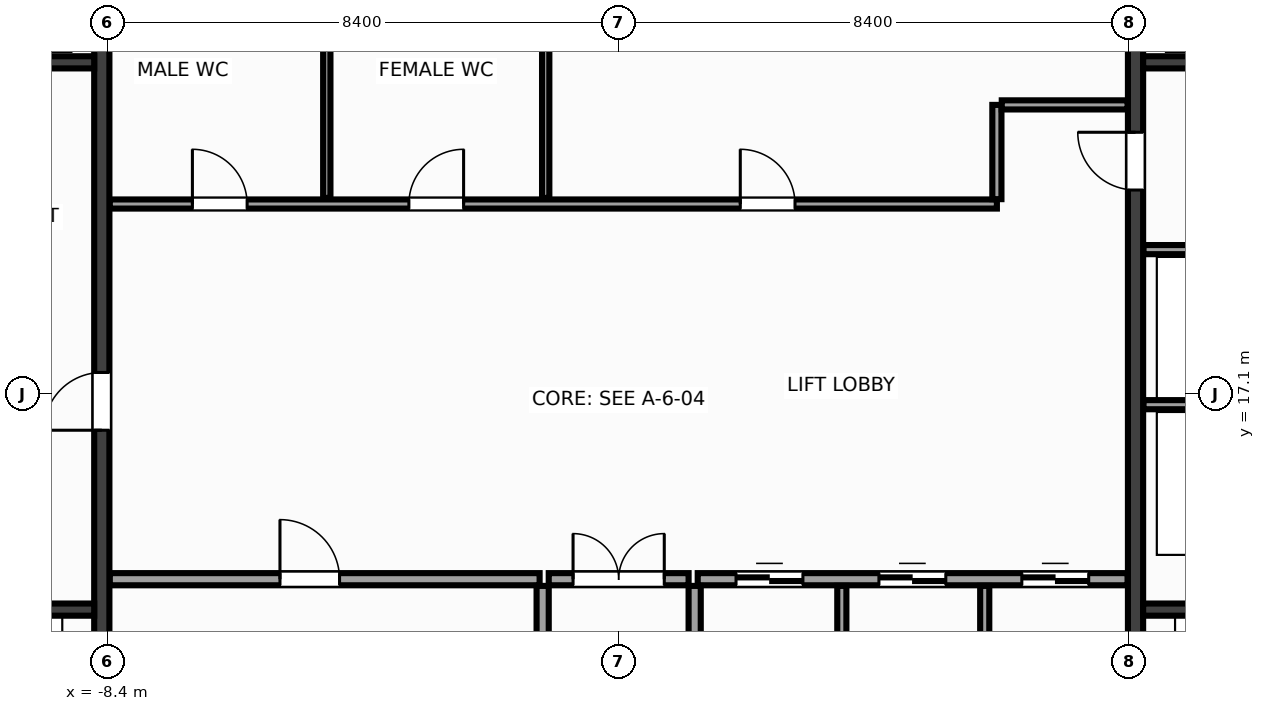
"""IFC4 building model, lengths in metres.
Left out: names, types, materials, properties, quantities, classifications, styles, units other than length and angle.
Written with IfcOpenShell. Run it as: python <this file> out.ifc"""

import sys

from ifc_helpers import new_model, si_unit, direction, frame, frame_2d, origin, place, context, subcontext, project, spatial, rectangle, extrude, source, transform, mapped, element, fill, save


model = new_model("IFC4")
c1 = context("Model", 3, precision=1e-05, world=origin(), true_north=direction((0.0, 1.0)))
c2 = subcontext(c1, "Body", "Model", "MODEL_VIEW")
j1 = project(units=[si_unit("LENGTHUNIT", "METRE"), si_unit("PLANEANGLEUNIT", "RADIAN")], contexts=[c1])
p1 = place(None, origin())
s1 = spatial("IfcSite", under=j1, at=p1, CompositionType="ELEMENT")
p2 = place(p1, origin())
s2 = spatial("IfcBuilding", under=s1, at=p2, CompositionType="ELEMENT")
p3 = place(p2, frame((0.0, 0.0, 106.4)))
s3 = spatial("IfcBuildingStorey", under=s2, at=p3, CompositionType="ELEMENT", Elevation=106.4)
m1 = source(origin(), c2, "Body", "SweptSolid", [
    extrude(rectangle(XDim=12.95, YDim=0.25, at=frame_2d((6.475, 0.0))), origin(), (0.0, 0.0, 1.0), 3.6),
])
p4 = place(p3, frame((-8.5, 10.525, 0.0), z_axis=(0.0, 0.0, 1.0), x_axis=(0.0, 1.0, 0.0)))
e1 = element("IfcWall", 1, at=p4, inside=s3, PredefinedType="SHEAR", context=c2, shape_type="MappedRepresentation", body=[
    mapped(m1, transform((0.0, 0.0, 0.0), x_axis=(1.0, 0.0, 0.0), y_axis=(0.0, 1.0, 0.0), z_axis=(0.0, 0.0, 1.0), scale=1.0)),
])
p5 = place(p4, frame((5.975, 0.0, 0.0)))
e2 = element("IfcOpeningElement", 2, at=p5, cuts=e1, PredefinedType="OPENING", context=c2, shape_type="SweptSolid", body=[
    extrude(rectangle(XDim=0.95, YDim=2.15, at=frame_2d((0.475, 1.075))), frame((0.0, 0.137, 0.0), z_axis=(0.0, -1.0, 0.0), x_axis=(1.0, 0.0, 0.0)), (0.0, 0.0, 1.0), 0.274),
])
p6 = place(p3, frame((8.5, 10.525, 0.0), z_axis=(0.0, 0.0, 1.0), x_axis=(0.0, 1.0, 0.0)))
e3 = element("IfcWall", 3, at=p6, inside=s3, PredefinedType="SHEAR", context=c2, shape_type="MappedRepresentation", body=[
    mapped(m1, transform((0.0, 0.0, 0.0), x_axis=(1.0, 0.0, 0.0), y_axis=(0.0, 1.0, 0.0), z_axis=(0.0, 0.0, 1.0), scale=1.0)),
])
p7 = place(p6, frame((9.925, 0.0, 0.0)))
e4 = element("IfcOpeningElement", 4, at=p7, cuts=e3, PredefinedType="OPENING", context=c2, shape_type="SweptSolid", body=[
    extrude(rectangle(XDim=0.95, YDim=2.15, at=frame_2d((0.475, 1.075))), frame((0.0, 0.137, 0.0), z_axis=(0.0, -1.0, 0.0), x_axis=(1.0, 0.0, 0.0)), (0.0, 0.0, 1.0), 0.274),
])
m2 = source(origin(), c2, "Body", "SweptSolid", [
    extrude(rectangle(XDim=2.825, YDim=0.2, at=frame_2d((1.413, 0.0))), origin(), (0.0, 0.0, 1.0), 3.6),
])
for number, where, z_axis, x_axis in (
    (5, (-11.45, 13.55, 0.0), (0.0, 0.0, 1.0), (1.0, 0.0, 0.0)),
    (6, (8.625, 13.55, 0.0), (0.0, 0.0, 1.0), (1.0, 0.0, 0.0)),
):
    element("IfcWall", number, at=place(p3, frame(where, z_axis=z_axis, x_axis=x_axis)), inside=s3, PredefinedType="SHEAR", context=c2, shape_type="MappedRepresentation", body=[
        mapped(m2, transform((0.0, 0.0, 0.0), x_axis=(1.0, 0.0, 0.0), y_axis=(0.0, 1.0, 0.0), z_axis=(0.0, 0.0, 1.0), scale=1.0)),
    ])
m3 = source(origin(), c2, "Body", "SweptSolid", [
    extrude(rectangle(XDim=3.02, YDim=0.2, at=frame_2d((1.51, 0.0))), origin(), (0.0, 0.0, 1.0), 3.6),
])
for number, where, z_axis, x_axis in (
    (7, (-11.645, 22.55, 0.0), (0.0, 0.0, 1.0), (1.0, 0.0, 0.0)),
    (8, (8.625, 22.55, 0.0), (0.0, 0.0, 1.0), (1.0, 0.0, 0.0)),
):
    element("IfcWall", number, at=place(p3, frame(where, z_axis=z_axis, x_axis=x_axis)), inside=s3, PredefinedType="SHEAR", context=c2, shape_type="MappedRepresentation", body=[
        mapped(m3, transform((0.0, 0.0, 0.0), x_axis=(1.0, 0.0, 0.0), y_axis=(0.0, 1.0, 0.0), z_axis=(0.0, 0.0, 1.0), scale=1.0)),
    ])
m4 = source(origin(), c2, "Body", "SweptSolid", [
    extrude(rectangle(XDim=3.01, YDim=0.15, at=frame_2d((1.505, 0.0))), origin(), (0.0, 0.0, 1.0), 3.36),
])
for number, where, z_axis, x_axis in (
    (9, (8.63, 16.92, 0.0), (0.0, 0.0, 1.0), (1.0, 0.0, 0.0)),
    (10, (8.63, 19.47, 0.0), (0.0, 0.0, 1.0), (1.0, 0.0, 0.0)),
):
    element("IfcWall", number, at=place(p3, frame(where, z_axis=z_axis, x_axis=x_axis)), inside=s3, PredefinedType="PARTITIONING", context=c2, shape_type="MappedRepresentation", body=[
        mapped(m4, transform((0.0, 0.0, 0.0), x_axis=(1.0, 0.0, 0.0), y_axis=(0.0, 1.0, 0.0), z_axis=(0.0, 0.0, 1.0), scale=1.0)),
    ])
m5 = source(origin(), c2, "Body", "SweptSolid", [
    extrude(rectangle(XDim=7.07, YDim=0.2, at=frame_2d((3.535, 0.0))), origin(), (0.0, 0.0, 1.0), 3.36),
])
p8 = place(p3, frame((-8.37, 14.05, 0.0), z_axis=(0.0, 0.0, 1.0), x_axis=(1.0, 0.0, 0.0)))
e11 = element("IfcWall", 11, at=p8, inside=s3, PredefinedType="PARTITIONING", context=c2, shape_type="MappedRepresentation", body=[
    mapped(m5, transform((0.0, 0.0, 0.0), x_axis=(1.0, 0.0, 0.0), y_axis=(0.0, 1.0, 0.0), z_axis=(0.0, 0.0, 1.0), scale=1.0)),
])
p9 = place(p8, frame((2.8, 0.0, 0.0)))
e12 = element("IfcOpeningElement", 12, at=p9, cuts=e11, PredefinedType="OPENING", context=c2, shape_type="SweptSolid", body=[
    extrude(rectangle(XDim=0.98, YDim=2.15, at=frame_2d((0.49, 1.075))), frame((0.0, 0.112, 0.0), z_axis=(0.0, -1.0, 0.0), x_axis=(1.0, 0.0, 0.0)), (0.0, 0.0, 1.0), 0.224),
])
p10 = place(p3, frame((1.3, 14.05, 0.0), z_axis=(0.0, 0.0, 1.0), x_axis=(1.0, 0.0, 0.0)))
e13 = element("IfcWall", 13, at=p10, inside=s3, PredefinedType="PARTITIONING", context=c2, shape_type="MappedRepresentation", body=[
    mapped(m5, transform((0.0, 0.0, 0.0), x_axis=(1.0, 0.0, 0.0), y_axis=(0.0, 1.0, 0.0), z_axis=(0.0, 0.0, 1.0), scale=1.0)),
])
p11 = place(p10, frame((0.63, 0.0, 0.0)))
e14 = element("IfcOpeningElement", 14, at=p11, cuts=e13, PredefinedType="OPENING", context=c2, shape_type="SweptSolid", body=[
    extrude(rectangle(XDim=1.1, YDim=2.15, at=frame_2d((0.55, 1.075))), frame((0.0, 0.112, 0.0), z_axis=(0.0, -1.0, 0.0), x_axis=(1.0, 0.0, 0.0)), (0.0, 0.0, 1.0), 0.224),
])
p12 = place(p10, frame((2.98, 0.0, 0.0)))
e15 = element("IfcOpeningElement", 15, at=p12, cuts=e13, PredefinedType="OPENING", context=c2, shape_type="SweptSolid", body=[
    extrude(rectangle(XDim=1.1, YDim=2.15, at=frame_2d((0.55, 1.075))), frame((0.0, 0.112, 0.0), z_axis=(0.0, -1.0, 0.0), x_axis=(1.0, 0.0, 0.0)), (0.0, 0.0, 1.0), 0.224),
])
p13 = place(p10, frame((5.33, 0.0, 0.0)))
e16 = element("IfcOpeningElement", 16, at=p13, cuts=e13, PredefinedType="OPENING", context=c2, shape_type="SweptSolid", body=[
    extrude(rectangle(XDim=1.1, YDim=2.15, at=frame_2d((0.55, 1.075))), frame((0.0, 0.112, 0.0), z_axis=(0.0, -1.0, 0.0), x_axis=(1.0, 0.0, 0.0)), (0.0, 0.0, 1.0), 0.224),
])
m6 = source(origin(), c2, "Body", "SweptSolid", [
    extrude(rectangle(XDim=3.415, YDim=0.2, at=frame_2d((1.708, 0.0))), origin(), (0.0, 0.0, 1.0), 3.36),
])
for number, where, z_axis, x_axis in (
    (17, (-1.25, 10.525, 0.0), (0.0, 0.0, 1.0), (0.0, 1.0, 0.0)),
    (18, (1.25, 10.525, 0.0), (0.0, 0.0, 1.0), (0.0, 1.0, 0.0)),
):
    element("IfcWall", number, at=place(p3, frame(where, z_axis=z_axis, x_axis=x_axis)), inside=s3, PredefinedType="PARTITIONING", context=c2, shape_type="MappedRepresentation", body=[
        mapped(m6, transform((0.0, 0.0, 0.0), x_axis=(1.0, 0.0, 0.0), y_axis=(0.0, 1.0, 0.0), z_axis=(0.0, 0.0, 1.0), scale=1.0)),
    ])
m7 = source(origin(), c2, "Body", "SweptSolid", [
    extrude(rectangle(XDim=2.3, YDim=0.2, at=frame_2d((1.15, 0.0))), origin(), (0.0, 0.0, 1.0), 3.36),
])
p14 = place(p3, frame((-1.15, 14.05, 0.0), z_axis=(0.0, 0.0, 1.0), x_axis=(1.0, 0.0, 0.0)))
e19 = element("IfcWall", 19, at=p14, inside=s3, PredefinedType="PARTITIONING", context=c2, shape_type="MappedRepresentation", body=[
    mapped(m7, transform((0.0, 0.0, 0.0), x_axis=(1.0, 0.0, 0.0), y_axis=(0.0, 1.0, 0.0), z_axis=(0.0, 0.0, 1.0), scale=1.0)),
])
p15 = place(p14, frame((0.4, 0.0, 0.0)))
e20 = element("IfcOpeningElement", 20, at=p15, cuts=e19, PredefinedType="OPENING", context=c2, shape_type="SweptSolid", body=[
    extrude(rectangle(XDim=1.5, YDim=2.2, at=frame_2d((0.75, 1.1))), frame((0.0, 0.112, 0.0), z_axis=(0.0, -1.0, 0.0), x_axis=(1.0, 0.0, 0.0)), (0.0, 0.0, 1.0), 0.224),
])
m8 = source(origin(), c2, "Body", "SweptSolid", [
    extrude(rectangle(XDim=14.59, YDim=0.15, at=frame_2d((7.295, 0.0))), origin(), (0.0, 0.0, 1.0), 3.36),
])
p16 = place(p3, frame((-8.37, 20.22, 0.0), z_axis=(0.0, 0.0, 1.0), x_axis=(1.0, 0.0, 0.0)))
e21 = element("IfcWall", 21, at=p16, inside=s3, PredefinedType="PARTITIONING", context=c2, shape_type="MappedRepresentation", body=[
    mapped(m8, transform((0.0, 0.0, 0.0), x_axis=(1.0, 0.0, 0.0), y_axis=(0.0, 1.0, 0.0), z_axis=(0.0, 0.0, 1.0), scale=1.0)),
])
p17 = place(p16, frame((1.36, 0.0, 0.0)))
e22 = element("IfcOpeningElement", 22, at=p17, cuts=e21, PredefinedType="OPENING", context=c2, shape_type="SweptSolid", body=[
    extrude(rectangle(XDim=0.9, YDim=2.15, at=frame_2d((0.45, 1.075))), frame((0.0, 0.087, 0.0), z_axis=(0.0, -1.0, 0.0), x_axis=(1.0, 0.0, 0.0)), (0.0, 0.0, 1.0), 0.174),
])
p18 = place(p16, frame((4.92, 0.0, 0.0)))
e23 = element("IfcOpeningElement", 23, at=p18, cuts=e21, PredefinedType="OPENING", context=c2, shape_type="SweptSolid", body=[
    extrude(rectangle(XDim=0.9, YDim=2.15, at=frame_2d((0.45, 1.075))), frame((0.0, 0.087, 0.0), z_axis=(0.0, -1.0, 0.0), x_axis=(1.0, 0.0, 0.0)), (0.0, 0.0, 1.0), 0.174),
])
p19 = place(p16, frame((10.37, 0.0, 0.0)))
e24 = element("IfcOpeningElement", 24, at=p19, cuts=e21, PredefinedType="OPENING", context=c2, shape_type="SweptSolid", body=[
    extrude(rectangle(XDim=0.9, YDim=2.15, at=frame_2d((0.45, 1.075))), frame((0.0, 0.087, 0.0), z_axis=(0.0, -1.0, 0.0), x_axis=(1.0, 0.0, 0.0)), (0.0, 0.0, 1.0), 0.174),
])
m9 = source(origin(), c2, "Body", "SweptSolid", [
    extrude(rectangle(XDim=1.55, YDim=0.15, at=frame_2d((0.775, 0.0))), origin(), (0.0, 0.0, 1.0), 3.36),
])
p20 = place(p3, frame((6.22, 20.3, 0.0), z_axis=(0.0, 0.0, 1.0), x_axis=(0.0, 1.0, 0.0)))
e25 = element("IfcWall", 25, at=p20, inside=s3, PredefinedType="PARTITIONING", context=c2, shape_type="MappedRepresentation", body=[
    mapped(m9, transform((0.0, 0.0, 0.0), x_axis=(1.0, 0.0, 0.0), y_axis=(0.0, 1.0, 0.0), z_axis=(0.0, 0.0, 1.0), scale=1.0)),
])
m10 = source(origin(), c2, "Body", "SweptSolid", [
    extrude(rectangle(XDim=2.07, YDim=0.15, at=frame_2d((1.035, 0.0))), origin(), (0.0, 0.0, 1.0), 3.36),
])
p21 = place(p3, frame((6.3, 21.85, 0.0), z_axis=(0.0, 0.0, 1.0), x_axis=(1.0, 0.0, 0.0)))
e26 = element("IfcWall", 26, at=p21, inside=s3, PredefinedType="PARTITIONING", context=c2, shape_type="MappedRepresentation", body=[
    mapped(m10, transform((0.0, 0.0, 0.0), x_axis=(1.0, 0.0, 0.0), y_axis=(0.0, 1.0, 0.0), z_axis=(0.0, 0.0, 1.0), scale=1.0)),
])
m11 = source(origin(), c2, "Body", "SweptSolid", [
    extrude(rectangle(XDim=3.415, YDim=0.15, at=frame_2d((1.708, 0.0))), origin(), (0.0, 0.0, 1.0), 3.36),
])
for number, where, z_axis, x_axis in (
    (27, (3.67, 10.525, 0.0), (0.0, 0.0, 1.0), (0.0, 1.0, 0.0)),
    (28, (6.02, 10.525, 0.0), (0.0, 0.0, 1.0), (0.0, 1.0, 0.0)),
):
    element("IfcWall", number, at=place(p3, frame(where, z_axis=z_axis, x_axis=x_axis)), inside=s3, PredefinedType="PARTITIONING", context=c2, shape_type="MappedRepresentation", body=[
        mapped(m11, transform((0.0, 0.0, 0.0), x_axis=(1.0, 0.0, 0.0), y_axis=(0.0, 1.0, 0.0), z_axis=(0.0, 0.0, 1.0), scale=1.0)),
    ])
m12 = source(origin(), c2, "Body", "SweptSolid", [
    extrude(rectangle(XDim=3.115, YDim=0.12, at=frame_2d((1.558, 0.0))), origin(), (0.0, 0.0, 1.0), 3.36),
])
for number, where, z_axis, x_axis in (
    (29, (-4.8, 20.32, 0.0), (0.0, 0.0, 1.0), (0.0, 1.0, 0.0)),
    (30, (-1.2, 20.32, 0.0), (0.0, 0.0, 1.0), (0.0, 1.0, 0.0)),
):
    element("IfcWall", number, at=place(p3, frame(where, z_axis=z_axis, x_axis=x_axis)), inside=s3, PredefinedType="PARTITIONING", context=c2, shape_type="MappedRepresentation", body=[
        mapped(m12, transform((0.0, 0.0, 0.0), x_axis=(1.0, 0.0, 0.0), y_axis=(0.0, 1.0, 0.0), z_axis=(0.0, 0.0, 1.0), scale=1.0)),
    ])
m13 = source(origin(), c2, "Body", "SweptSolid", [
    extrude(rectangle(XDim=0.95, YDim=2.15, at=frame_2d((0.475, 1.075))), frame((0.0, 0.025, 0.0), z_axis=(0.0, -1.0, 0.0), x_axis=(1.0, 0.0, 0.0)), (0.0, 0.0, 1.0), 0.05),
])
p22 = place(p5, origin())
e31 = element("IfcDoor", 31, at=p22, inside=s3, OperationType="SINGLE_SWING_LEFT", PredefinedType="DOOR", context=c2, shape_type="MappedRepresentation", body=[
    mapped(m13, transform((0.0, 0.0, 0.0), x_axis=(1.0, 0.0, 0.0), y_axis=(0.0, 1.0, 0.0), z_axis=(0.0, 0.0, 1.0), scale=1.0)),
])
fill(e2, e31)
m14 = source(origin(), c2, "Body", "SweptSolid", [
    extrude(rectangle(XDim=0.95, YDim=2.15, at=frame_2d((0.475, 1.075))), frame((0.0, 0.025, 0.0), z_axis=(0.0, -1.0, 0.0), x_axis=(1.0, 0.0, 0.0)), (0.0, 0.0, 1.0), 0.05),
])
p23 = place(p7, origin())
e32 = element("IfcDoor", 32, at=p23, inside=s3, OperationType="SINGLE_SWING_RIGHT", PredefinedType="DOOR", context=c2, shape_type="MappedRepresentation", body=[
    mapped(m14, transform((0.0, 0.0, 0.0), x_axis=(1.0, 0.0, 0.0), y_axis=(0.0, 1.0, 0.0), z_axis=(0.0, 0.0, 1.0), scale=1.0)),
])
fill(e4, e32)
m15 = source(origin(), c2, "Body", "SweptSolid", [
    extrude(rectangle(XDim=0.98, YDim=2.15, at=frame_2d((0.49, 1.075))), frame((0.0, 0.025, 0.0), z_axis=(0.0, -1.0, 0.0), x_axis=(1.0, 0.0, 0.0)), (0.0, 0.0, 1.0), 0.05),
])
p24 = place(p9, origin())
e33 = element("IfcDoor", 33, at=p24, inside=s3, OperationType="SINGLE_SWING_LEFT", PredefinedType="DOOR", context=c2, shape_type="MappedRepresentation", body=[
    mapped(m15, transform((0.0, 0.0, 0.0), x_axis=(1.0, 0.0, 0.0), y_axis=(0.0, 1.0, 0.0), z_axis=(0.0, 0.0, 1.0), scale=1.0)),
])
fill(e12, e33)
m16 = source(origin(), c2, "Body", "SweptSolid", [
    extrude(rectangle(XDim=1.1, YDim=2.15, at=frame_2d((0.55, 1.075))), frame((0.0, 0.025, 0.0), z_axis=(0.0, -1.0, 0.0), x_axis=(1.0, 0.0, 0.0)), (0.0, 0.0, 1.0), 0.05),
])
p25 = place(p11, origin())
e34 = element("IfcDoor", 34, at=p25, inside=s3, OperationType="DOUBLE_DOOR_SLIDING", PredefinedType="DOOR", context=c2, shape_type="MappedRepresentation", body=[
    mapped(m16, transform((0.0, 0.0, 0.0), x_axis=(1.0, 0.0, 0.0), y_axis=(0.0, 1.0, 0.0), z_axis=(0.0, 0.0, 1.0), scale=1.0)),
])
fill(e14, e34)
p26 = place(p12, origin())
e35 = element("IfcDoor", 35, at=p26, inside=s3, OperationType="DOUBLE_DOOR_SLIDING", PredefinedType="DOOR", context=c2, shape_type="MappedRepresentation", body=[
    mapped(m16, transform((0.0, 0.0, 0.0), x_axis=(1.0, 0.0, 0.0), y_axis=(0.0, 1.0, 0.0), z_axis=(0.0, 0.0, 1.0), scale=1.0)),
])
fill(e15, e35)
p27 = place(p13, origin())
e36 = element("IfcDoor", 36, at=p27, inside=s3, OperationType="DOUBLE_DOOR_SLIDING", PredefinedType="DOOR", context=c2, shape_type="MappedRepresentation", body=[
    mapped(m16, transform((0.0, 0.0, 0.0), x_axis=(1.0, 0.0, 0.0), y_axis=(0.0, 1.0, 0.0), z_axis=(0.0, 0.0, 1.0), scale=1.0)),
])
fill(e16, e36)
m17 = source(origin(), c2, "Body", "SweptSolid", [
    extrude(rectangle(XDim=1.5, YDim=2.2, at=frame_2d((0.75, 1.1))), frame((0.0, 0.025, 0.0), z_axis=(0.0, -1.0, 0.0), x_axis=(1.0, 0.0, 0.0)), (0.0, 0.0, 1.0), 0.05),
])
p28 = place(p15, origin())
e37 = element("IfcDoor", 37, at=p28, inside=s3, OperationType="DOUBLE_DOOR_SINGLE_SWING", PredefinedType="DOOR", context=c2, shape_type="MappedRepresentation", body=[
    mapped(m17, transform((0.0, 0.0, 0.0), x_axis=(1.0, 0.0, 0.0), y_axis=(0.0, 1.0, 0.0), z_axis=(0.0, 0.0, 1.0), scale=1.0)),
])
fill(e20, e37)
m18 = source(origin(), c2, "Body", "SweptSolid", [
    extrude(rectangle(XDim=0.9, YDim=2.15, at=frame_2d((0.45, 1.075))), frame((0.0, 0.025, 0.0), z_axis=(0.0, -1.0, 0.0), x_axis=(1.0, 0.0, 0.0)), (0.0, 0.0, 1.0), 0.05),
])
p29 = place(p17, origin())
e38 = element("IfcDoor", 38, at=p29, inside=s3, OperationType="SINGLE_SWING_LEFT", PredefinedType="DOOR", context=c2, shape_type="MappedRepresentation", body=[
    mapped(m18, transform((0.0, 0.0, 0.0), x_axis=(1.0, 0.0, 0.0), y_axis=(0.0, 1.0, 0.0), z_axis=(0.0, 0.0, 1.0), scale=1.0)),
])
fill(e22, e38)
p30 = place(p18, origin())
e39 = element("IfcDoor", 39, at=p30, inside=s3, OperationType="SINGLE_SWING_RIGHT", PredefinedType="DOOR", context=c2, shape_type="MappedRepresentation", body=[
    mapped(m18, transform((0.0, 0.0, 0.0), x_axis=(1.0, 0.0, 0.0), y_axis=(0.0, 1.0, 0.0), z_axis=(0.0, 0.0, 1.0), scale=1.0)),
])
fill(e23, e39)
p31 = place(p19, origin())
e40 = element("IfcDoor", 40, at=p31, inside=s3, OperationType="SINGLE_SWING_LEFT", PredefinedType="DOOR", context=c2, shape_type="MappedRepresentation", body=[
    mapped(m18, transform((0.0, 0.0, 0.0), x_axis=(1.0, 0.0, 0.0), y_axis=(0.0, 1.0, 0.0), z_axis=(0.0, 0.0, 1.0), scale=1.0)),
])
fill(e24, e40)
save(model, sys.argv[1])
